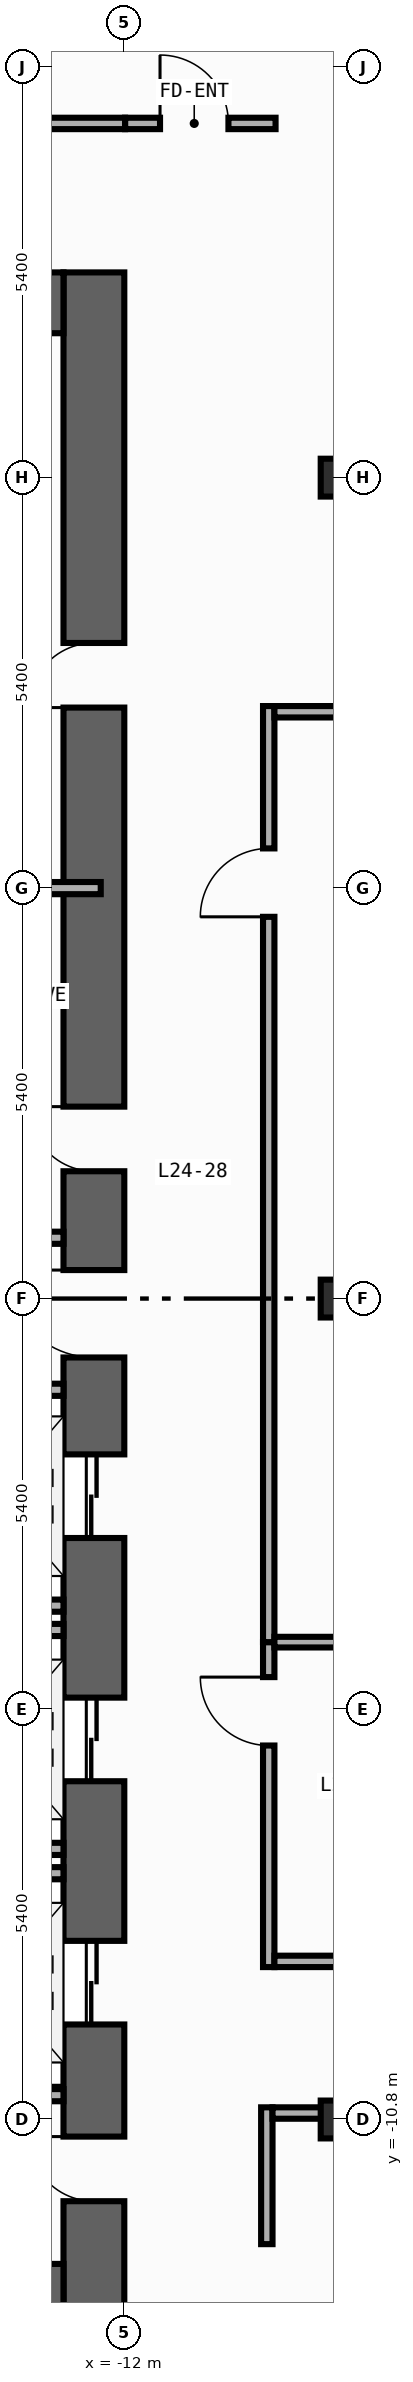
"""IFC4 building model, lengths in metres.
Left out: names, types, materials, properties, quantities, classifications, styles, units other than length and angle.
Written with IfcOpenShell. Run it as: python <this file> out.ifc"""

import sys

from ifc_helpers import new_model, si_unit, direction, frame, frame_2d, origin, origin_2d, place, context, subcontext, project, spatial, rectangle, i_section, extrude, element, fill, save


model = new_model("IFC4")
c1 = context("Model", 3, precision=1e-05, world=origin(), true_north=direction((0.0, 1.0)))
c2 = subcontext(c1, "Body", "Model", "MODEL_VIEW")
j1 = project(units=[si_unit("LENGTHUNIT", "METRE"), si_unit("PLANEANGLEUNIT", "RADIAN")], contexts=[c1])
p1 = place(None, origin())
s1 = spatial("IfcSite", under=j1, at=p1, CompositionType="ELEMENT")
p2 = place(p1, origin())
s2 = spatial("IfcBuilding", under=s1, at=p2, CompositionType="ELEMENT")
p3 = place(p2, frame((0.0, 0.0, 105.8)))
s3 = spatial("IfcBuildingStorey", under=s2, at=p3, CompositionType="ELEMENT", Elevation=105.8)
p4 = place(p3, frame((-12.4, -13.5, 0.0), z_axis=(0.0, 0.0, 1.0), x_axis=(0.0, 1.0, 0.0)))
e1 = element("IfcWall", 1, at=p4, inside=s3, PredefinedType="SHEAR", context=c2, shape_type="SweptSolid", body=[
    extrude(rectangle(XDim=27.0, YDim=0.8, at=frame_2d((13.5, 0.0))), origin(), (0.0, 0.0, 1.0), 3.94),
])
p5 = place(p4, frame((10.35, 0.0, 0.0)))
e2 = element("IfcOpeningElement", 2, at=p5, cuts=e1, PredefinedType="OPENING", context=c2, shape_type="SweptSolid", body=[
    extrude(rectangle(XDim=1.1, YDim=2.2, at=frame_2d((0.55, 1.1))), frame((0.0, 0.41, 0.0), z_axis=(0.0, -1.0, 0.0), x_axis=(1.0, 0.0, 0.0)), (0.0, 0.0, 1.0), 0.82),
])
p6 = place(p4, frame((7.15, 0.0, 0.0)))
e3 = element("IfcOpeningElement", 3, at=p6, cuts=e1, PredefinedType="OPENING", context=c2, shape_type="SweptSolid", body=[
    extrude(rectangle(XDim=1.1, YDim=2.2, at=frame_2d((0.55, 1.1))), frame((0.0, 0.41, 0.0), z_axis=(0.0, -1.0, 0.0), x_axis=(1.0, 0.0, 0.0)), (0.0, 0.0, 1.0), 0.82),
])
p7 = place(p4, frame((3.95, 0.0, 0.0)))
e4 = element("IfcOpeningElement", 4, at=p7, cuts=e1, PredefinedType="OPENING", context=c2, shape_type="SweptSolid", body=[
    extrude(rectangle(XDim=1.1, YDim=2.2, at=frame_2d((0.55, 1.1))), frame((0.0, 0.41, 0.0), z_axis=(0.0, -1.0, 0.0), x_axis=(1.0, 0.0, 0.0)), (0.0, 0.0, 1.0), 0.82),
])
p8 = place(p4, frame((15.175, 0.0, 0.0)))
e5 = element("IfcOpeningElement", 5, at=p8, cuts=e1, PredefinedType="OPENING", context=c2, shape_type="SweptSolid", body=[
    extrude(rectangle(XDim=0.85, YDim=2.1, at=frame_2d((0.425, 1.05))), frame((0.0, 0.41, 0.0), z_axis=(0.0, -1.0, 0.0), x_axis=(1.0, 0.0, 0.0)), (0.0, 0.0, 1.0), 0.82),
])
p9 = place(p4, frame((21.275, 0.0, 0.0)))
e6 = element("IfcOpeningElement", 6, at=p9, cuts=e1, PredefinedType="OPENING", context=c2, shape_type="SweptSolid", body=[
    extrude(rectangle(XDim=0.85, YDim=2.1, at=frame_2d((0.425, 1.05))), frame((0.0, 0.41, 0.0), z_axis=(0.0, -1.0, 0.0), x_axis=(1.0, 0.0, 0.0)), (0.0, 0.0, 1.0), 0.82),
])
p10 = place(p4, frame((12.725, 0.0, 0.0)))
e7 = element("IfcOpeningElement", 7, at=p10, cuts=e1, PredefinedType="OPENING", context=c2, shape_type="SweptSolid", body=[
    extrude(rectangle(XDim=1.15, YDim=2.2, at=frame_2d((0.575, 1.1))), frame((0.0, 0.41, 0.0), z_axis=(0.0, -1.0, 0.0), x_axis=(1.0, 0.0, 0.0)), (0.0, 0.0, 1.0), 0.82),
])
p11 = place(p4, frame((1.625, 0.0, 0.0)))
e8 = element("IfcOpeningElement", 8, at=p11, cuts=e1, PredefinedType="OPENING", context=c2, shape_type="SweptSolid", body=[
    extrude(rectangle(XDim=0.85, YDim=2.1, at=frame_2d((0.425, 1.05))), frame((0.0, 0.41, 0.0), z_axis=(0.0, -1.0, 0.0), x_axis=(1.0, 0.0, 0.0)), (0.0, 0.0, 1.0), 0.82),
])
for number, where, z_axis, x_axis in (
    (9, (-19.6, -13.1, 0.0), (0.0, 0.0, 1.0), (1.0, 0.0, 0.0)),
    (10, (-19.6, 13.1, 0.0), (0.0, 0.0, 1.0), (1.0, 0.0, 0.0)),
):
    element("IfcWall", number, at=place(p3, frame(where, z_axis=z_axis, x_axis=x_axis)), inside=s3, PredefinedType="SHEAR", context=c2, shape_type="SweptSolid", body=[
        extrude(rectangle(XDim=6.8, YDim=0.8, at=frame_2d((3.4, 0.0))), origin(), (0.0, 0.0, 1.0), 3.94),
    ])
for number, where, z_axis, x_axis in (
    (11, (-9.2, -10.8, 0.0), (0.0, 0.0, 1.0), (1.0, 0.0, 0.0)),
    (12, (-9.2, 0.0, 0.0), (0.0, 0.0, 1.0), (1.0, 0.0, 0.0)),
    (13, (-9.2, 10.8, 0.0), (0.0, 0.0, 1.0), (1.0, 0.0, 0.0)),
):
    element("IfcColumn", number, at=place(p3, frame(where, z_axis=z_axis, x_axis=x_axis)), inside=s3, PredefinedType="COLUMN", context=c2, shape_type="SweptSolid", body=[
        extrude(i_section(OverallWidth=0.432, OverallDepth=0.498, WebThickness=0.045, FlangeThickness=0.07, FilletRadius=0.022, at=origin_2d()), origin(), (0.0, 0.0, 1.0), 4.2),
    ])
for number, where, z_axis, x_axis in (
    (14, (-14.99, -4.04, 0.0), (0.0, 0.0, 1.0), (1.0, 0.0, 0.0)),
    (15, (-14.99, -7.24, 0.0), (0.0, 0.0, 1.0), (1.0, 0.0, 0.0)),
    (16, (-14.99, -4.36, 0.0), (0.0, 0.0, 1.0), (1.0, 0.0, 0.0)),
    (17, (-14.99, -7.56, 0.0), (0.0, 0.0, 1.0), (1.0, 0.0, 0.0)),
):
    element("IfcWall", number, at=place(p3, frame(where, z_axis=z_axis, x_axis=x_axis)), inside=s3, PredefinedType="STANDARD", context=c2, shape_type="SweptSolid", body=[
        extrude(rectangle(XDim=2.19, YDim=0.16, at=frame_2d((1.095, 0.0))), origin(), (0.0, 0.0, 1.0), 3.94),
    ])
for number, where, z_axis, x_axis in (
    (18, (-15.4, 0.8, 0.0), (0.0, 0.0, 1.0), (1.0, 0.0, 0.0)),
    (19, (-15.4, -1.2, 0.0), (0.0, 0.0, 1.0), (1.0, 0.0, 0.0)),
    (20, (-15.4, -10.48, 0.0), (0.0, 0.0, 1.0), (1.0, 0.0, 0.0)),
):
    element("IfcWall", number, at=place(p3, frame(where, z_axis=z_axis, x_axis=x_axis)), inside=s3, PredefinedType="STANDARD", context=c2, shape_type="SweptSolid", body=[
        extrude(rectangle(XDim=2.6, YDim=0.16, at=frame_2d((1.3, 0.0))), origin(), (0.0, 0.0, 1.0), 3.94),
    ])
p12 = place(p3, frame((-15.375, 5.4, 0.0), z_axis=(0.0, 0.0, 1.0), x_axis=(1.0, 0.0, 0.0)))
e21 = element("IfcWall", 21, at=p12, inside=s3, PredefinedType="PARTITIONING", context=c2, shape_type="SweptSolid", body=[
    extrude(rectangle(XDim=3.065, YDim=0.16, at=frame_2d((1.532, 0.0))), origin(), (0.0, 0.0, 1.0), 3.94),
])
p13 = place(p3, frame((-11.99, 15.46, 0.0), z_axis=(0.0, 0.0, 1.0), x_axis=(1.0, 0.0, 0.0)))
e22 = element("IfcWall", 22, at=p13, inside=s3, PredefinedType="PARTITIONING", context=c2, shape_type="SweptSolid", body=[
    extrude(rectangle(XDim=1.98, YDim=0.15, at=frame_2d((0.99, 0.0))), origin(), (0.0, 0.0, 1.0), 3.94),
])
p14 = place(p13, frame((0.46, 0.0, 0.0)))
e23 = element("IfcOpeningElement", 23, at=p14, cuts=e22, PredefinedType="OPENING", context=c2, shape_type="SweptSolid", body=[
    extrude(rectangle(XDim=0.9, YDim=2.15, at=frame_2d((0.45, 1.075))), frame((0.0, 0.085, 0.0), z_axis=(0.0, -1.0, 0.0), x_axis=(1.0, 0.0, 0.0)), (0.0, 0.0, 1.0), 0.17),
])
p15 = place(p3, frame((-10.1, -8.795, 0.0), z_axis=(0.0, 0.0, 1.0), x_axis=(0.0, 1.0, 0.0)))
e24 = element("IfcWall", 24, at=p15, inside=s3, PredefinedType="PARTITIONING", context=c2, shape_type="SweptSolid", body=[
    extrude(rectangle(XDim=4.275, YDim=0.15, at=frame_2d((2.137, 0.0))), origin(), (0.0, 0.0, 1.0), 3.94),
])
p16 = place(p15, frame((2.915, 0.0, 0.0)))
e25 = element("IfcOpeningElement", 25, at=p16, cuts=e24, PredefinedType="OPENING", context=c2, shape_type="SweptSolid", body=[
    extrude(rectangle(XDim=0.9, YDim=2.15, at=frame_2d((0.45, 1.075))), frame((0.0, 0.085, 0.0), z_axis=(0.0, -1.0, 0.0), x_axis=(1.0, 0.0, 0.0)), (0.0, 0.0, 1.0), 0.17),
])
p17 = place(p3, frame((-10.1, -4.52, 0.0), z_axis=(0.0, 0.0, 1.0), x_axis=(0.0, 1.0, 0.0)))
e26 = element("IfcWall", 26, at=p17, inside=s3, PredefinedType="PARTITIONING", context=c2, shape_type="SweptSolid", body=[
    extrude(rectangle(XDim=12.315, YDim=0.15, at=frame_2d((6.157, 0.0))), origin(), (0.0, 0.0, 1.0), 3.94),
])
p18 = place(p17, frame((9.542, 0.0, 0.0)))
e27 = element("IfcOpeningElement", 27, at=p18, cuts=e26, PredefinedType="OPENING", context=c2, shape_type="SweptSolid", body=[
    extrude(rectangle(XDim=0.9, YDim=2.15, at=frame_2d((0.45, 1.075))), frame((0.0, 0.085, 0.0), z_axis=(0.0, -1.0, 0.0), x_axis=(1.0, 0.0, 0.0)), (0.0, 0.0, 1.0), 0.17),
])
p19 = place(p3, frame((-10.125, -12.44, 0.0), z_axis=(0.0, 0.0, 1.0), x_axis=(0.0, 1.0, 0.0)))
e28 = element("IfcWall", 28, at=p19, inside=s3, PredefinedType="PARTITIONING", context=c2, shape_type="SweptSolid", body=[
    extrude(rectangle(XDim=1.8, YDim=0.15, at=frame_2d((0.9, 0.0))), origin(), (0.0, 0.0, 1.0), 3.94),
])
p20 = place(p3, frame((-10.025, 7.72, 0.0), z_axis=(0.0, 0.0, 1.0), x_axis=(1.0, 0.0, 0.0)))
e29 = element("IfcWall", 29, at=p20, inside=s3, PredefinedType="PARTITIONING", context=c2, shape_type="SweptSolid", body=[
    extrude(rectangle(XDim=5.42, YDim=0.15, at=frame_2d((2.71, 0.0))), origin(), (0.0, 0.0, 1.0), 3.94),
])
p21 = place(p20, frame((4.06, 0.0, 0.0)))
e30 = element("IfcOpeningElement", 30, at=p21, cuts=e29, PredefinedType="OPENING", context=c2, shape_type="SweptSolid", body=[
    extrude(rectangle(XDim=0.9, YDim=2.15, at=frame_2d((0.45, 1.075))), frame((0.0, 0.085, 0.0), z_axis=(0.0, -1.0, 0.0), x_axis=(1.0, 0.0, 0.0)), (0.0, 0.0, 1.0), 0.17),
])
p22 = place(p3, frame((-10.025, -8.72, 0.0), z_axis=(0.0, 0.0, 1.0), x_axis=(1.0, 0.0, 0.0)))
e31 = element("IfcWall", 31, at=p22, inside=s3, PredefinedType="PARTITIONING", context=c2, shape_type="SweptSolid", body=[
    extrude(rectangle(XDim=4.465, YDim=0.15, at=frame_2d((2.232, 0.0))), origin(), (0.0, 0.0, 1.0), 3.94),
])
p23 = place(p22, frame((3.105, 0.0, 0.0)))
e32 = element("IfcOpeningElement", 32, at=p23, cuts=e31, PredefinedType="OPENING", context=c2, shape_type="SweptSolid", body=[
    extrude(rectangle(XDim=0.9, YDim=2.15, at=frame_2d((0.45, 1.075))), frame((0.0, 0.085, 0.0), z_axis=(0.0, -1.0, 0.0), x_axis=(1.0, 0.0, 0.0)), (0.0, 0.0, 1.0), 0.17),
])
p24 = place(p3, frame((-10.05, -10.715, 0.0), z_axis=(0.0, 0.0, 1.0), x_axis=(1.0, 0.0, 0.0)))
e33 = element("IfcWall", 33, at=p24, inside=s3, PredefinedType="PARTITIONING", context=c2, shape_type="SweptSolid", body=[
    extrude(rectangle(XDim=8.265, YDim=0.15, at=frame_2d((4.133, 0.0))), origin(), (0.0, 0.0, 1.0), 3.24),
])
p25 = place(p24, frame((6.905, 0.0, 0.0)))
e34 = element("IfcOpeningElement", 34, at=p25, cuts=e33, PredefinedType="OPENING", context=c2, shape_type="SweptSolid", body=[
    extrude(rectangle(XDim=0.9, YDim=2.15, at=frame_2d((0.45, 1.075))), frame((0.0, 0.085, 0.0), z_axis=(0.0, -1.0, 0.0), x_axis=(1.0, 0.0, 0.0)), (0.0, 0.0, 1.0), 0.17),
])
p26 = place(p3, frame((-20.64, 15.46, 0.0), z_axis=(0.0, 0.0, 1.0), x_axis=(1.0, 0.0, 0.0)))
e35 = element("IfcWall", 35, at=p26, inside=s3, PredefinedType="PARTITIONING", context=c2, shape_type="SweptSolid", body=[
    extrude(rectangle(XDim=8.65, YDim=0.15, at=frame_2d((4.325, 0.0))), origin(), (0.0, 0.0, 1.0), 3.94),
])
p27 = place(p26, frame((2.871, 0.0, 0.0)))
e36 = element("IfcOpeningElement", 36, at=p27, cuts=e35, PredefinedType="OPENING", context=c2, shape_type="SweptSolid", body=[
    extrude(rectangle(XDim=0.9, YDim=2.15, at=frame_2d((0.45, 1.075))), frame((0.0, 0.085, 0.0), z_axis=(0.0, -1.0, 0.0), x_axis=(1.0, 0.0, 0.0)), (0.0, 0.0, 1.0), 0.17),
])
p28 = place(p3, frame((-10.025, -4.52, 0.0), z_axis=(0.0, 0.0, 1.0), x_axis=(1.0, 0.0, 0.0)))
e37 = element("IfcWall", 37, at=p28, inside=s3, PredefinedType="PARTITIONING", context=c2, shape_type="SweptSolid", body=[
    extrude(rectangle(XDim=4.465, YDim=0.14, at=frame_2d((2.232, 0.0))), origin(), (0.0, 0.0, 1.0), 3.94),
])
p29 = place(p5, origin())
e38 = element("IfcDoor", 38, at=p29, inside=s3, OperationType="DOUBLE_DOOR_SLIDING", PredefinedType="DOOR", context=c2, shape_type="SweptSolid", body=[
    extrude(rectangle(XDim=1.1, YDim=2.2, at=frame_2d((0.55, 1.1))), frame((0.0, 0.025, 0.0), z_axis=(0.0, -1.0, 0.0), x_axis=(1.0, 0.0, 0.0)), (0.0, 0.0, 1.0), 0.05),
])
fill(e2, e38)
p30 = place(p6, origin())
e39 = element("IfcDoor", 39, at=p30, inside=s3, OperationType="DOUBLE_DOOR_SLIDING", PredefinedType="DOOR", context=c2, shape_type="SweptSolid", body=[
    extrude(rectangle(XDim=1.1, YDim=2.2, at=frame_2d((0.55, 1.1))), frame((0.0, 0.025, 0.0), z_axis=(0.0, -1.0, 0.0), x_axis=(1.0, 0.0, 0.0)), (0.0, 0.0, 1.0), 0.05),
])
fill(e3, e39)
p31 = place(p7, origin())
e40 = element("IfcDoor", 40, at=p31, inside=s3, OperationType="DOUBLE_DOOR_SLIDING", PredefinedType="DOOR", context=c2, shape_type="SweptSolid", body=[
    extrude(rectangle(XDim=1.1, YDim=2.2, at=frame_2d((0.55, 1.1))), frame((0.0, 0.025, 0.0), z_axis=(0.0, -1.0, 0.0), x_axis=(1.0, 0.0, 0.0)), (0.0, 0.0, 1.0), 0.05),
])
fill(e4, e40)
p32 = place(p8, origin())
e41 = element("IfcDoor", 41, at=p32, inside=s3, OperationType="SINGLE_SWING_RIGHT", PredefinedType="DOOR", context=c2, shape_type="SweptSolid", body=[
    extrude(rectangle(XDim=0.85, YDim=2.1, at=frame_2d((0.425, 1.05))), frame((0.0, 0.025, 0.0), z_axis=(0.0, -1.0, 0.0), x_axis=(1.0, 0.0, 0.0)), (0.0, 0.0, 1.0), 0.05),
])
fill(e5, e41)
p33 = place(p9, origin())
e42 = element("IfcDoor", 42, at=p33, inside=s3, OperationType="SINGLE_SWING_LEFT", PredefinedType="DOOR", context=c2, shape_type="SweptSolid", body=[
    extrude(rectangle(XDim=0.85, YDim=2.1, at=frame_2d((0.425, 1.05))), frame((0.0, 0.025, 0.0), z_axis=(0.0, -1.0, 0.0), x_axis=(1.0, 0.0, 0.0)), (0.0, 0.0, 1.0), 0.05),
])
fill(e6, e42)
p34 = place(p10, origin())
e43 = element("IfcDoor", 43, at=p34, inside=s3, OperationType="SINGLE_SWING_RIGHT", PredefinedType="DOOR", context=c2, shape_type="SweptSolid", body=[
    extrude(rectangle(XDim=1.15, YDim=2.2, at=frame_2d((0.575, 1.1))), frame((0.0, 0.025, 0.0), z_axis=(0.0, -1.0, 0.0), x_axis=(1.0, 0.0, 0.0)), (0.0, 0.0, 1.0), 0.05),
])
fill(e7, e43)
p35 = place(p11, origin())
e44 = element("IfcDoor", 44, at=p35, inside=s3, OperationType="SINGLE_SWING_RIGHT", PredefinedType="DOOR", context=c2, shape_type="SweptSolid", body=[
    extrude(rectangle(XDim=0.85, YDim=2.1, at=frame_2d((0.425, 1.05))), frame((0.0, 0.025, 0.0), z_axis=(0.0, -1.0, 0.0), x_axis=(1.0, 0.0, 0.0)), (0.0, 0.0, 1.0), 0.05),
])
fill(e8, e44)
p36 = place(p14, origin())
e45 = element("IfcDoor", 45, at=p36, inside=s3, OperationType="SINGLE_SWING_LEFT", PredefinedType="DOOR", context=c2, shape_type="SweptSolid", body=[
    extrude(rectangle(XDim=0.9, YDim=2.15, at=frame_2d((0.45, 1.075))), frame((0.0, 0.025, 0.0), z_axis=(0.0, -1.0, 0.0), x_axis=(1.0, 0.0, 0.0)), (0.0, 0.0, 1.0), 0.05),
])
fill(e23, e45)
p37 = place(p16, origin())
e46 = element("IfcDoor", 46, at=p37, inside=s3, OperationType="SINGLE_SWING_RIGHT", PredefinedType="DOOR", context=c2, shape_type="SweptSolid", body=[
    extrude(rectangle(XDim=0.9, YDim=2.15, at=frame_2d((0.45, 1.075))), frame((0.0, 0.025, 0.0), z_axis=(0.0, -1.0, 0.0), x_axis=(1.0, 0.0, 0.0)), (0.0, 0.0, 1.0), 0.05),
])
fill(e25, e46)
p38 = place(p18, origin())
e47 = element("IfcDoor", 47, at=p38, inside=s3, OperationType="SINGLE_SWING_LEFT", PredefinedType="DOOR", context=c2, shape_type="SweptSolid", body=[
    extrude(rectangle(XDim=0.9, YDim=2.15, at=frame_2d((0.45, 1.075))), frame((0.0, 0.025, 0.0), z_axis=(0.0, -1.0, 0.0), x_axis=(1.0, 0.0, 0.0)), (0.0, 0.0, 1.0), 0.05),
])
fill(e27, e47)
save(model, sys.argv[1])
